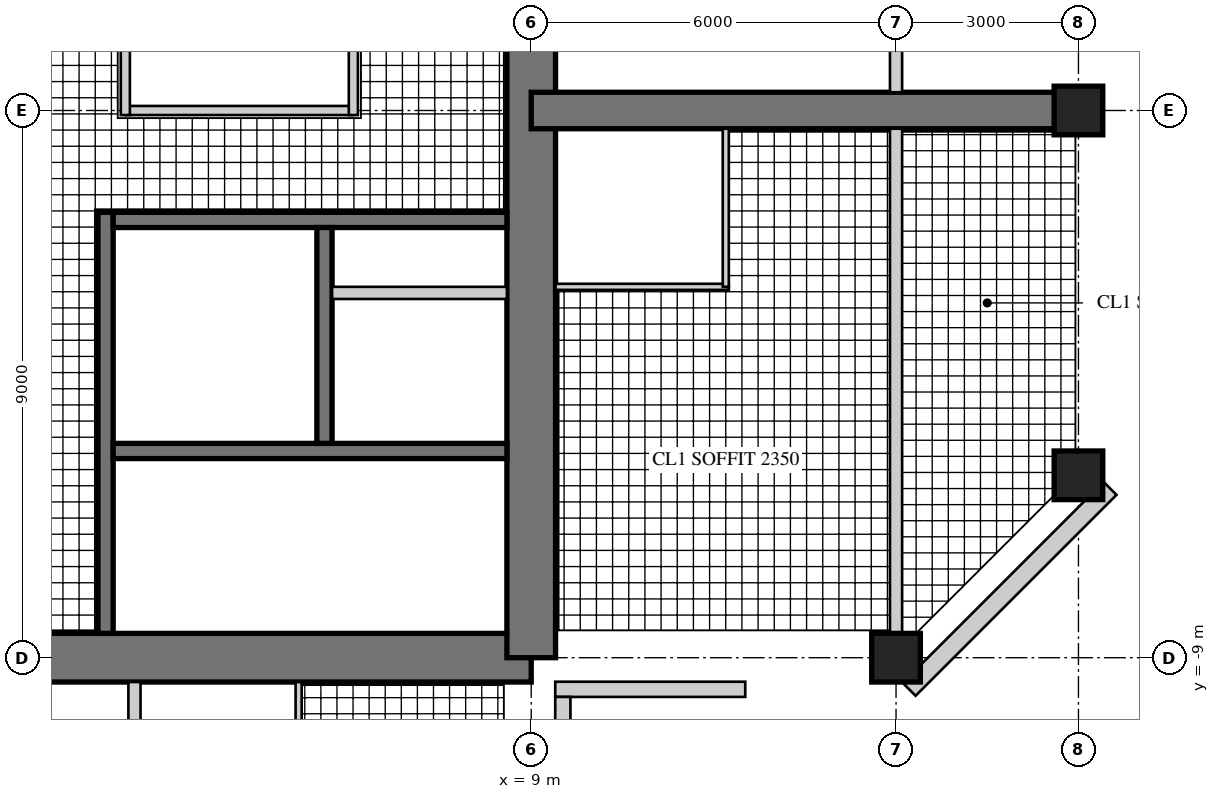
"""IFC4 building model, lengths in metres.
Left out: names, types, materials, properties, quantities, classifications, styles, units other than length and angle.
Written with IfcOpenShell. Run it as: python <this file> out.ifc"""

import sys

from ifc_helpers import new_model, si_unit, direction, frame, frame_2d, origin, origin_2d, place, context, subcontext, project, spatial, rectangle, hollow_rectangle, extrude, element, fill, save


model = new_model("IFC4")
c1 = context("Model", 3, precision=1e-05, world=origin(), true_north=direction((0.0, 1.0)))
c2 = subcontext(c1, "Body", "Model", "MODEL_VIEW")
j1 = project(units=[si_unit("LENGTHUNIT", "METRE"), si_unit("PLANEANGLEUNIT", "RADIAN")], contexts=[c1])
p1 = place(None, origin())
s1 = spatial("IfcSite", under=j1, at=p1, CompositionType="ELEMENT")
p2 = place(p1, origin())
s2 = spatial("IfcBuilding", under=s1, at=p2, CompositionType="ELEMENT")
p3 = place(p2, frame((0.0, 0.0, 225.5)))
s3 = spatial("IfcBuildingStorey", under=s2, at=p3, CompositionType="ELEMENT", Elevation=225.5)
p4 = place(p3, frame((-9.0, -9.0, 0.0), z_axis=(0.0, 0.0, 1.0), x_axis=(1.0, 0.0, 0.0)))
e1 = element("IfcWall", 1, at=p4, inside=s3, PredefinedType="SHEAR", context=c2, shape_type="SweptSolid", body=[
    extrude(rectangle(XDim=18.0, YDim=0.8, at=frame_2d((9.0, 0.0))), origin(), (0.0, 0.0, 1.0), 3.4),
])
p5 = place(p4, frame((9.8, 0.0, 0.0)))
e2 = element("IfcOpeningElement", 2, at=p5, cuts=e1, PredefinedType="OPENING", context=c2, shape_type="SweptSolid", body=[
    extrude(rectangle(XDim=1.0, YDim=2.4, at=frame_2d((0.5, 1.2))), frame((0.0, 0.41, 0.0), z_axis=(0.0, -1.0, 0.0), x_axis=(1.0, 0.0, 0.0)), (0.0, 0.0, 1.0), 0.82),
])
p6 = place(p3, frame((9.0, -9.0, 0.0), z_axis=(0.0, 0.0, 1.0), x_axis=(0.0, 1.0, 0.0)))
e3 = element("IfcWall", 3, at=p6, inside=s3, PredefinedType="SHEAR", context=c2, shape_type="SweptSolid", body=[
    extrude(rectangle(XDim=18.0, YDim=0.8, at=frame_2d((9.0, 0.0))), origin(), (0.0, 0.0, 1.0), 3.4),
])
p7 = place(p6, frame((9.8, 0.0, 0.0)))
e4 = element("IfcOpeningElement", 4, at=p7, cuts=e3, PredefinedType="OPENING", context=c2, shape_type="SweptSolid", body=[
    extrude(rectangle(XDim=1.0, YDim=2.4, at=frame_2d((0.5, 1.2))), frame((0.0, 0.41, 0.0), z_axis=(0.0, -1.0, 0.0), x_axis=(1.0, 0.0, 0.0)), (0.0, 0.0, 1.0), 0.82),
])
p8 = place(p3, frame((2.0, -1.675, 0.0), z_axis=(0.0, 0.0, 1.0), x_axis=(0.0, -1.0, 0.0)))
e5 = element("IfcWall", 5, at=p8, inside=s3, PredefinedType="SHEAR", context=c2, shape_type="SweptSolid", body=[
    extrude(rectangle(XDim=6.925, YDim=0.25, at=frame_2d((3.462, 0.0))), origin(), (0.0, 0.0, 1.0), 3.4),
])
p9 = place(p8, frame((0.725, 0.0, 0.0)))
e6 = element("IfcOpeningElement", 6, at=p9, cuts=e5, PredefinedType="OPENING", context=c2, shape_type="SweptSolid", body=[
    extrude(rectangle(XDim=1.0, YDim=2.1, at=frame_2d((0.5, 1.05))), frame((0.0, 0.135, 0.0), z_axis=(0.0, -1.0, 0.0), x_axis=(1.0, 0.0, 0.0)), (0.0, 0.0, 1.0), 0.27),
])
p10 = place(p3, frame((2.125, -1.8, 0.0), z_axis=(0.0, 0.0, 1.0), x_axis=(1.0, 0.0, 0.0)))
e7 = element("IfcWall", 7, at=p10, inside=s3, PredefinedType="SHEAR", context=c2, shape_type="SweptSolid", body=[
    extrude(rectangle(XDim=6.475, YDim=0.25, at=frame_2d((3.238, 0.0))), origin(), (0.0, 0.0, 1.0), 3.4),
])
p11 = place(p3, frame((2.125, -5.6, 0.0), z_axis=(0.0, 0.0, 1.0), x_axis=(1.0, 0.0, 0.0)))
e8 = element("IfcWall", 8, at=p11, inside=s3, PredefinedType="SHEAR", context=c2, shape_type="SweptSolid", body=[
    extrude(rectangle(XDim=6.475, YDim=0.25, at=frame_2d((3.238, 0.0))), origin(), (0.0, 0.0, 1.0), 3.4),
])
p12 = place(p11, frame((0.175, 0.0, 0.0)))
e9 = element("IfcOpeningElement", 9, at=p12, cuts=e8, PredefinedType="OPENING", context=c2, shape_type="SweptSolid", body=[
    extrude(rectangle(XDim=1.0, YDim=2.1, at=frame_2d((0.5, 1.05))), frame((0.0, 0.135, 0.0), z_axis=(0.0, -1.0, 0.0), x_axis=(1.0, 0.0, 0.0)), (0.0, 0.0, 1.0), 0.27),
])
p13 = place(p3, frame((5.6, -1.925, 0.0), z_axis=(0.0, 0.0, 1.0), x_axis=(0.0, -1.0, 0.0)))
e10 = element("IfcWall", 10, at=p13, inside=s3, PredefinedType="SHEAR", context=c2, shape_type="SweptSolid", body=[
    extrude(rectangle(XDim=3.55, YDim=0.25, at=frame_2d((1.775, 0.0))), origin(), (0.0, 0.0, 1.0), 3.4),
])
p14 = place(p13, frame((1.525, 0.0, 0.0)))
e11 = element("IfcOpeningElement", 11, at=p14, cuts=e10, PredefinedType="OPENING", context=c2, shape_type="SweptSolid", body=[
    extrude(rectangle(XDim=1.1, YDim=2.2, at=frame_2d((0.55, 1.1))), frame((0.0, 0.135, 0.0), z_axis=(0.0, -1.0, 0.0), x_axis=(1.0, 0.0, 0.0)), (0.0, 0.0, 1.0), 0.27),
])
p15 = place(p13, frame((0.075, 0.0, 0.0)))
e12 = element("IfcOpeningElement", 12, at=p15, cuts=e10, PredefinedType="OPENING", context=c2, shape_type="SweptSolid", body=[
    extrude(rectangle(XDim=0.8, YDim=2.1, at=frame_2d((0.4, 1.05))), frame((0.0, 0.135, 0.0), z_axis=(0.0, -1.0, 0.0), x_axis=(1.0, 0.0, 0.0)), (0.0, 0.0, 1.0), 0.27),
])
p16 = place(p3, frame((5.725, -3.0, 0.0), z_axis=(0.0, 0.0, 1.0), x_axis=(1.0, 0.0, 0.0)))
e13 = element("IfcWall", 13, at=p16, inside=s3, PredefinedType="PARTITIONING", context=c2, shape_type="SweptSolid", body=[
    extrude(rectangle(XDim=2.875, YDim=0.2, at=frame_2d((1.438, 0.0))), origin(), (0.0, 0.0, 1.0), 3.4),
])
p17 = place(p3, frame((9.0, 0.0, 0.0), z_axis=(0.0, 0.0, 1.0), x_axis=(1.0, 0.0, 0.0)))
e14 = element("IfcWall", 14, at=p17, inside=s3, PredefinedType="SHEAR", context=c2, shape_type="SweptSolid", body=[
    extrude(rectangle(XDim=9.0, YDim=0.6, at=frame_2d((4.5, 0.0))), origin(), (0.0, 0.0, 1.0), 3.4),
])
p18 = place(p17, frame((3.8, 0.0, 0.0)))
e15 = element("IfcOpeningElement", 15, at=p18, cuts=e14, PredefinedType="OPENING", context=c2, shape_type="SweptSolid", body=[
    extrude(rectangle(XDim=1.0, YDim=2.15, at=frame_2d((0.5, 1.075))), frame((0.0, 0.31, 0.0), z_axis=(0.0, -1.0, 0.0), x_axis=(1.0, 0.0, 0.0)), (0.0, 0.0, 1.0), 0.62),
])
p19 = place(p17, frame((7.0, 0.0, 0.0)))
e16 = element("IfcOpeningElement", 16, at=p19, cuts=e14, PredefinedType="OPENING", context=c2, shape_type="SweptSolid", body=[
    extrude(rectangle(XDim=1.0, YDim=2.2, at=frame_2d((0.5, 1.1))), frame((0.0, 0.31, 0.0), z_axis=(0.0, -1.0, 0.0), x_axis=(1.0, 0.0, 0.0)), (0.0, 0.0, 1.0), 0.62),
])
for number, where, z_axis, x_axis in (
    (17, (15.0, -9.0, 0.0), (0.0, 0.0, 1.0), (1.0, 0.0, 0.0)),
    (18, (18.0, -6.0, 0.0), (0.0, 0.0, 1.0), (1.0, 0.0, 0.0)),
    (19, (18.0, 0.0, 0.0), (0.0, 0.0, 1.0), (1.0, 0.0, 0.0)),
):
    element("IfcColumn", number, at=place(p3, frame(where, z_axis=z_axis, x_axis=x_axis)), inside=s3, PredefinedType="COLUMN", context=c2, shape_type="SweptSolid", body=[
        extrude(rectangle(XDim=0.8, YDim=0.8, at=origin_2d()), origin(), (0.0, 0.0, 1.0), 3.4),
    ])
p20 = place(p3, frame((9.395, -9.52, 0.0), z_axis=(0.0, 0.0, 1.0), x_axis=(1.0, 0.0, 0.0)))
e20 = element("IfcWall", 20, at=p20, inside=s3, PredefinedType="SOLIDWALL", context=c2, shape_type="SweptSolid", body=[
    extrude(rectangle(XDim=3.125, YDim=0.25, at=frame_2d((1.562, 0.0))), origin(), (0.0, 0.0, 1.0), 3.22),
])
p21 = place(p20, frame((0.6, 0.0, 0.0)))
e21 = element("IfcOpeningElement", 21, at=p21, cuts=e20, PredefinedType="OPENING", context=c2, shape_type="SweptSolid", body=[
    extrude(rectangle(XDim=1.0, YDim=2.2, at=frame_2d((0.5, 1.1))), frame((0.0, 0.135, 0.0), z_axis=(0.0, -1.0, 0.0), x_axis=(1.0, 0.0, 0.0)), (0.0, 0.0, 1.0), 0.27),
])
p22 = place(p3, frame((15.215, -9.52, 0.0), z_axis=(0.0, 0.0, 1.0), x_axis=(0.707106781187, 0.707106781187, 0.0)))
e22 = element("IfcWall", 22, at=p22, inside=s3, PredefinedType="SOLIDWALL", context=c2, shape_type="SweptSolid", body=[
    extrude(rectangle(XDim=4.674, YDim=0.3, at=frame_2d((2.337, 0.0))), origin(), (0.0, 0.0, 1.0), 3.22),
])
p23 = place(p22, frame((1.887, 0.0, 0.3)))
e23 = element("IfcOpeningElement", 23, at=p23, cuts=e22, PredefinedType="OPENING", context=c2, shape_type="SweptSolid", body=[
    extrude(rectangle(XDim=0.9, YDim=2.4, at=frame_2d((0.45, 1.2))), frame((0.0, 0.16, 0.0), z_axis=(0.0, -1.0, 0.0), x_axis=(1.0, 0.0, 0.0)), (0.0, 0.0, 1.0), 0.32),
])
p24 = place(p3, frame((9.52, -12.52, 0.0), z_axis=(0.0, 0.0, 1.0), x_axis=(0.0, 1.0, 0.0)))
e24 = element("IfcWall", 24, at=p24, inside=s3, PredefinedType="SOLIDWALL", context=c2, shape_type="SweptSolid", body=[
    extrude(rectangle(XDim=2.875, YDim=0.25, at=frame_2d((1.438, 0.0))), origin(), (0.0, 0.0, 1.0), 3.22),
])
p25 = place(p24, frame((0.6, 0.0, 0.0)))
e25 = element("IfcOpeningElement", 25, at=p25, cuts=e24, PredefinedType="OPENING", context=c2, shape_type="SweptSolid", body=[
    extrude(rectangle(XDim=1.0, YDim=2.2, at=frame_2d((0.5, 1.1))), frame((0.0, 0.135, 0.0), z_axis=(0.0, -1.0, 0.0), x_axis=(1.0, 0.0, 0.0)), (0.0, 0.0, 1.0), 0.27),
])
p26 = place(p3, frame((2.325, 0.0, 0.0), z_axis=(0.0, 0.0, 1.0), x_axis=(1.0, 0.0, 0.0)))
e26 = element("IfcWall", 26, at=p26, inside=s3, PredefinedType="PARTITIONING", context=c2, shape_type="SweptSolid", body=[
    extrude(rectangle(XDim=3.75, YDim=0.15, at=frame_2d((1.875, 0.0))), origin(), (0.0, 0.0, 1.0), 3.22),
])
p27 = place(p26, frame((0.4, 0.0, 0.0)))
e27 = element("IfcOpeningElement", 27, at=p27, cuts=e26, PredefinedType="OPENING", context=c2, shape_type="SweptSolid", body=[
    extrude(rectangle(XDim=1.0, YDim=2.1, at=frame_2d((0.5, 1.05))), frame((0.0, 0.085, 0.0), z_axis=(0.0, -1.0, 0.0), x_axis=(1.0, 0.0, 0.0)), (0.0, 0.0, 1.0), 0.17),
])
for number, where, z_axis, x_axis in (
    (28, (2.325, 1.875, 0.0), (0.0, 0.0, 1.0), (0.0, -1.0, 0.0)),
    (29, (6.075, -0.075, 0.0), (0.0, 0.0, 1.0), (0.0, 1.0, 0.0)),
):
    element("IfcWall", number, at=place(p3, frame(where, z_axis=z_axis, x_axis=x_axis)), inside=s3, PredefinedType="PARTITIONING", context=c2, shape_type="SweptSolid", body=[
        extrude(rectangle(XDim=1.95, YDim=0.15, at=frame_2d((0.975, 0.0))), origin(), (0.0, 0.0, 1.0), 3.22),
    ])
p28 = place(p3, frame((9.4, -2.9, 0.0), z_axis=(0.0, 0.0, 1.0), x_axis=(1.0, 0.0, 0.0)))
e30 = element("IfcWall", 30, at=p28, inside=s3, PredefinedType="PARTITIONING", context=c2, shape_type="SweptSolid", body=[
    extrude(rectangle(XDim=2.85, YDim=0.1, at=frame_2d((1.425, 0.0))), origin(), (0.0, 0.0, 1.0), 3.22),
])
p29 = place(p3, frame((12.2, -2.9, 0.0), z_axis=(0.0, 0.0, 1.0), x_axis=(0.0, 1.0, 0.0)))
e31 = element("IfcWall", 31, at=p29, inside=s3, PredefinedType="PARTITIONING", context=c2, shape_type="SweptSolid", body=[
    extrude(rectangle(XDim=2.6, YDim=0.1, at=frame_2d((1.3, 0.0))), origin(), (0.0, 0.0, 1.0), 3.22),
])
p30 = place(p29, frame((0.55, 0.0, 0.0)))
e32 = element("IfcOpeningElement", 32, at=p30, cuts=e31, PredefinedType="OPENING", context=c2, shape_type="SweptSolid", body=[
    extrude(rectangle(XDim=0.9, YDim=2.1, at=frame_2d((0.45, 1.05))), frame((0.0, 0.06, 0.0), z_axis=(0.0, -1.0, 0.0), x_axis=(1.0, 0.0, 0.0)), (0.0, 0.0, 1.0), 0.12),
])
p31 = place(p3, frame((15.0, -8.6, 0.0), z_axis=(0.0, 0.0, 1.0), x_axis=(0.0, 1.0, 0.0)))
e33 = element("IfcWall", 33, at=p31, inside=s3, PredefinedType="SOLIDWALL", context=c2, shape_type="SweptSolid", body=[
    extrude(rectangle(XDim=8.3, YDim=0.2, at=frame_2d((4.15, 0.0))), origin(), (0.0, 0.0, 1.0), 2.52),
])
p32 = place(p3, frame((15.0, 0.3, 0.0), z_axis=(0.0, 0.0, 1.0), x_axis=(0.0, 1.0, 0.0)))
e34 = element("IfcWall", 34, at=p32, inside=s3, PredefinedType="SOLIDWALL", context=c2, shape_type="SweptSolid", body=[
    extrude(rectangle(XDim=8.3, YDim=0.2, at=frame_2d((4.15, 0.0))), origin(), (0.0, 0.0, 1.0), 2.52),
])
p33 = place(p32, frame((0.45, 0.0, 0.0)))
e35 = element("IfcOpeningElement", 35, at=p33, cuts=e34, PredefinedType="OPENING", context=c2, shape_type="SweptSolid", body=[
    extrude(rectangle(XDim=1.0, YDim=2.2, at=frame_2d((0.5, 1.1))), frame((0.0, 0.11, 0.0), z_axis=(0.0, -1.0, 0.0), x_axis=(1.0, 0.0, 0.0)), (0.0, 0.0, 1.0), 0.22),
])
p34 = place(p3, frame((5.175, -9.4, 0.0), z_axis=(0.0, 0.0, 1.0), x_axis=(0.0, -1.0, 0.0)))
e36 = element("IfcWall", 36, at=p34, inside=s3, PredefinedType="PARTITIONING", context=c2, shape_type="SweptSolid", body=[
    extrude(rectangle(XDim=2.85, YDim=0.1, at=frame_2d((1.425, 0.0))), origin(), (0.0, 0.0, 1.0), 3.22),
])
p35 = place(p3, frame((2.475, -9.4, 0.0), z_axis=(0.0, 0.0, 1.0), x_axis=(0.0, -1.0, 0.0)))
e37 = element("IfcWall", 37, at=p35, inside=s3, PredefinedType="SOLIDWALL", context=c2, shape_type="SweptSolid", body=[
    extrude(rectangle(XDim=5.6, YDim=0.2, at=frame_2d((2.8, 0.0))), origin(), (0.0, 0.0, 1.0), 3.22),
])
p36 = place(p35, frame((3.4, 0.0, 0.0)))
e38 = element("IfcOpeningElement", 38, at=p36, cuts=e37, PredefinedType="OPENING", context=c2, shape_type="SweptSolid", body=[
    extrude(rectangle(XDim=1.0, YDim=2.15, at=frame_2d((0.5, 1.075))), frame((0.0, 0.11, 0.0), z_axis=(0.0, -1.0, 0.0), x_axis=(1.0, 0.0, 0.0)), (0.0, 0.0, 1.0), 0.22),
])
p37 = place(p21, origin())
e39 = element("IfcDoor", 39, at=p37, inside=s3, OperationType="SINGLE_SWING_LEFT", PredefinedType="DOOR", context=c2, shape_type="SweptSolid", body=[
    extrude(hollow_rectangle(XDim=1.0, YDim=2.2, WallThickness=0.06, at=frame_2d((0.5, 1.1))), frame((0.0, 0.025, 0.0), z_axis=(0.0, -1.0, 0.0), x_axis=(1.0, 0.0, 0.0)), (0.0, 0.0, 1.0), 0.05),
    extrude(rectangle(XDim=0.879, YDim=2.079, at=frame_2d((0.5, 1.1))), frame((0.0, 0.025, 0.0), z_axis=(0.0, -1.0, 0.0), x_axis=(1.0, 0.0, 0.0)), (0.0, 0.0, 1.0), 0.05),
])
fill(e21, e39)
p38 = place(p23, origin())
e40 = element("IfcWindow", 40, at=p38, inside=s3, PartitioningType="SINGLE_PANEL", PredefinedType="WINDOW", context=c2, shape_type="SweptSolid", body=[
    extrude(hollow_rectangle(XDim=0.9, YDim=2.4, WallThickness=0.06, at=frame_2d((0.45, 1.2))), frame((0.0, 0.03, 0.0), z_axis=(0.0, -1.0, 0.0), x_axis=(1.0, 0.0, 0.0)), (0.0, 0.0, 1.0), 0.06),
    extrude(rectangle(XDim=0.779, YDim=2.279, at=frame_2d((0.45, 1.2))), frame((0.0, 0.03, 0.0), z_axis=(0.0, -1.0, 0.0), x_axis=(1.0, 0.0, 0.0)), (0.0, 0.0, 1.0), 0.06),
])
fill(e23, e40)
p39 = place(p27, origin())
e41 = element("IfcDoor", 41, at=p39, inside=s3, OperationType="SINGLE_SWING_LEFT", PredefinedType="DOOR", context=c2, shape_type="SweptSolid", body=[
    extrude(rectangle(XDim=1.0, YDim=2.1, at=frame_2d((0.5, 1.05))), frame((0.0, 0.025, 0.0), z_axis=(0.0, -1.0, 0.0), x_axis=(1.0, 0.0, 0.0)), (0.0, 0.0, 1.0), 0.05),
])
fill(e27, e41)
p40 = place(p30, origin())
e42 = element("IfcDoor", 42, at=p40, inside=s3, OperationType="SINGLE_SWING_LEFT", PredefinedType="DOOR", context=c2, shape_type="SweptSolid", body=[
    extrude(rectangle(XDim=0.9, YDim=2.1, at=frame_2d((0.45, 1.05))), frame((0.0, 0.025, 0.0), z_axis=(0.0, -1.0, 0.0), x_axis=(1.0, 0.0, 0.0)), (0.0, 0.0, 1.0), 0.05),
])
fill(e32, e42)
p41 = place(p33, frame((1.0, 0.0, 0.0), z_axis=(0.0, 0.0, 1.0), x_axis=(-1.0, 0.0, 0.0)))
e43 = element("IfcDoor", 43, at=p41, inside=s3, OperationType="SINGLE_SWING_LEFT", PredefinedType="DOOR", context=c2, shape_type="SweptSolid", body=[
    extrude(rectangle(XDim=1.0, YDim=2.2, at=frame_2d((0.5, 1.1))), frame((0.0, 0.025, 0.0), z_axis=(0.0, -1.0, 0.0), x_axis=(1.0, 0.0, 0.0)), (0.0, 0.0, 1.0), 0.05),
])
fill(e35, e43)
p42 = place(p18, frame((1.0, 0.0, 0.0), z_axis=(0.0, 0.0, 1.0), x_axis=(-1.0, 0.0, 0.0)))
e44 = element("IfcDoor", 44, at=p42, inside=s3, OperationType="SINGLE_SWING_RIGHT", PredefinedType="DOOR", context=c2, shape_type="SweptSolid", body=[
    extrude(rectangle(XDim=1.0, YDim=2.15, at=frame_2d((0.5, 1.075))), frame((0.0, 0.025, 0.0), z_axis=(0.0, -1.0, 0.0), x_axis=(1.0, 0.0, 0.0)), (0.0, 0.0, 1.0), 0.05),
])
fill(e15, e44)
p43 = place(p19, origin())
e45 = element("IfcDoor", 45, at=p43, inside=s3, OperationType="SINGLE_SWING_LEFT", PredefinedType="DOOR", context=c2, shape_type="SweptSolid", body=[
    extrude(rectangle(XDim=1.0, YDim=2.2, at=frame_2d((0.5, 1.1))), frame((0.0, 0.025, 0.0), z_axis=(0.0, -1.0, 0.0), x_axis=(1.0, 0.0, 0.0)), (0.0, 0.0, 1.0), 0.05),
])
fill(e16, e45)
p44 = place(p5, origin())
e46 = element("IfcDoor", 46, at=p44, inside=s3, OperationType="SINGLE_SWING_RIGHT", PredefinedType="DOOR", context=c2, shape_type="SweptSolid", body=[
    extrude(rectangle(XDim=1.0, YDim=2.4, at=frame_2d((0.5, 1.2))), frame((0.0, 0.055, 0.0), z_axis=(0.0, -1.0, 0.0), x_axis=(1.0, 0.0, 0.0)), (0.0, 0.0, 1.0), 0.05),
])
fill(e2, e46)
p45 = place(p7, origin())
e47 = element("IfcDoor", 47, at=p45, inside=s3, OperationType="SINGLE_SWING_RIGHT", PredefinedType="DOOR", context=c2, shape_type="SweptSolid", body=[
    extrude(rectangle(XDim=1.0, YDim=2.4, at=frame_2d((0.5, 1.2))), frame((0.0, 0.055, 0.0), z_axis=(0.0, -1.0, 0.0), x_axis=(1.0, 0.0, 0.0)), (0.0, 0.0, 1.0), 0.05),
])
fill(e4, e47)
p46 = place(p9, origin())
e48 = element("IfcDoor", 48, at=p46, inside=s3, OperationType="SINGLE_SWING_LEFT", PredefinedType="DOOR", context=c2, shape_type="SweptSolid", body=[
    extrude(rectangle(XDim=1.0, YDim=2.1, at=frame_2d((0.5, 1.05))), frame((0.0, 0.025, 0.0), z_axis=(0.0, -1.0, 0.0), x_axis=(1.0, 0.0, 0.0)), (0.0, 0.0, 1.0), 0.05),
])
fill(e6, e48)
p47 = place(p12, frame((1.0, 0.0, 0.0), z_axis=(0.0, 0.0, 1.0), x_axis=(-1.0, 0.0, 0.0)))
e49 = element("IfcDoor", 49, at=p47, inside=s3, OperationType="SINGLE_SWING_RIGHT", PredefinedType="DOOR", context=c2, shape_type="SweptSolid", body=[
    extrude(rectangle(XDim=1.0, YDim=2.1, at=frame_2d((0.5, 1.05))), frame((0.0, 0.025, 0.0), z_axis=(0.0, -1.0, 0.0), x_axis=(1.0, 0.0, 0.0)), (0.0, 0.0, 1.0), 0.05),
])
fill(e9, e49)
p48 = place(p14, origin())
e50 = element("IfcDoor", 50, at=p48, inside=s3, OperationType="DOUBLE_DOOR_SLIDING", PredefinedType="DOOR", context=c2, shape_type="SweptSolid", body=[
    extrude(rectangle(XDim=1.1, YDim=2.2, at=frame_2d((0.55, 1.1))), frame((0.0, 0.025, 0.0), z_axis=(0.0, -1.0, 0.0), x_axis=(1.0, 0.0, 0.0)), (0.0, 0.0, 1.0), 0.05),
])
fill(e11, e50)
p49 = place(p15, origin())
e51 = element("IfcDoor", 51, at=p49, inside=s3, OperationType="SINGLE_SWING_LEFT", PredefinedType="DOOR", context=c2, shape_type="SweptSolid", body=[
    extrude(rectangle(XDim=0.8, YDim=2.1, at=frame_2d((0.4, 1.05))), frame((0.0, 0.025, 0.0), z_axis=(0.0, -1.0, 0.0), x_axis=(1.0, 0.0, 0.0)), (0.0, 0.0, 1.0), 0.05),
])
fill(e12, e51)
save(model, sys.argv[1])
